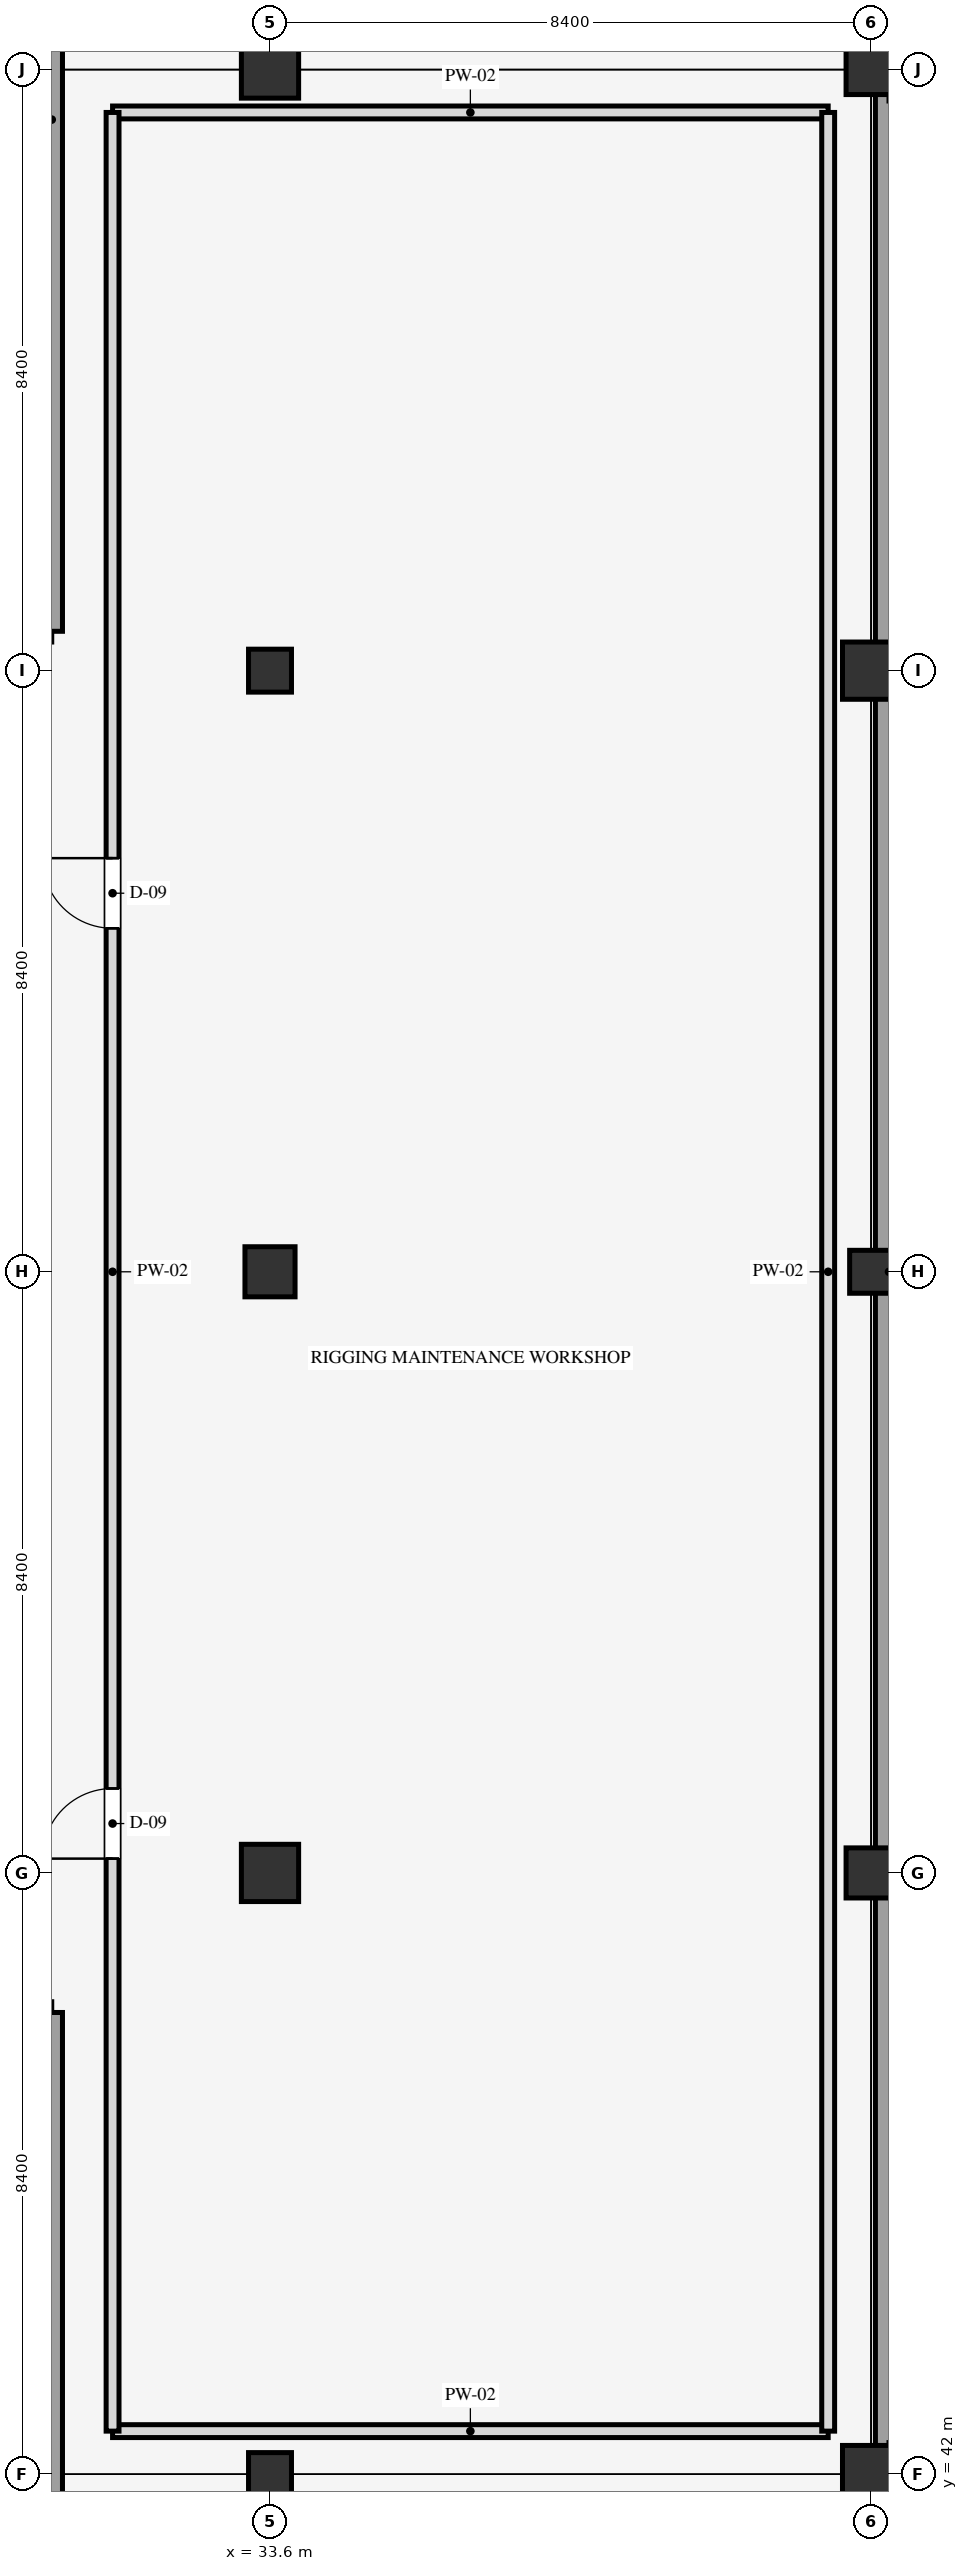
"""IFC4 building model, lengths in metres.
Left out: names, types, materials, properties, quantities, classifications, styles, units other than length and angle.
Written with IfcOpenShell. Run it as: python <this file> out.ifc"""

import sys

from ifc_helpers import new_model, si_unit, direction, frame, frame_2d, origin, origin_2d, place, context, subcontext, project, spatial, rectangle, extrude, element, fill, save


model = new_model("IFC4")
c1 = context("Model", 3, precision=1e-05, world=origin(), true_north=direction((0.0, 1.0)))
c2 = subcontext(c1, "Body", "Model", "MODEL_VIEW")
j1 = project(units=[si_unit("LENGTHUNIT", "METRE"), si_unit("PLANEANGLEUNIT", "RADIAN")], contexts=[c1])
p1 = place(None, origin())
s1 = spatial("IfcSite", under=j1, at=p1, CompositionType="ELEMENT")
p2 = place(p1, origin())
s2 = spatial("IfcBuilding", under=s1, at=p2, CompositionType="ELEMENT")
p3 = place(p2, frame((0.0, 0.0, 18.9)))
s3 = spatial("IfcBuildingStorey", under=s2, at=p3, CompositionType="ELEMENT", Elevation=18.9)
p4 = place(p3, frame((33.6, 42.0, 0.0), z_axis=(0.0, 0.0, 1.0), x_axis=(1.0, 0.0, 0.0)))
e1 = element("IfcColumn", 1, at=p4, inside=s3, PredefinedType="COLUMN", context=c2, shape_type="SweptSolid", body=[
    extrude(rectangle(XDim=0.6, YDim=0.6, at=origin_2d()), origin(), (0.0, 0.0, 1.0), 4.5),
])
p5 = place(p3, frame((33.6, 50.4, 0.0), z_axis=(0.0, 0.0, 1.0), x_axis=(1.0, 0.0, 0.0)))
e2 = element("IfcColumn", 2, at=p5, inside=s3, PredefinedType="COLUMN", context=c2, shape_type="SweptSolid", body=[
    extrude(rectangle(XDim=0.8, YDim=0.8, at=origin_2d()), origin(), (0.0, 0.0, 1.0), 4.5),
])
p6 = place(p3, frame((33.6, 58.8, 0.0), z_axis=(0.0, 0.0, 1.0), x_axis=(1.0, 0.0, 0.0)))
e3 = element("IfcColumn", 3, at=p6, inside=s3, PredefinedType="COLUMN", context=c2, shape_type="SweptSolid", body=[
    extrude(rectangle(XDim=0.7, YDim=0.7, at=origin_2d()), origin(), (0.0, 0.0, 1.0), 4.5),
])
p7 = place(p3, frame((33.6, 67.2, 0.0), z_axis=(0.0, 0.0, 1.0), x_axis=(1.0, 0.0, 0.0)))
e4 = element("IfcColumn", 4, at=p7, inside=s3, PredefinedType="COLUMN", context=c2, shape_type="SweptSolid", body=[
    extrude(rectangle(XDim=0.6, YDim=0.6, at=origin_2d()), origin(), (0.0, 0.0, 1.0), 4.5),
])
for number, where, z_axis, x_axis in (
    (5, (33.6, 75.6, 0.0), (0.0, 0.0, 1.0), (1.0, 0.0, 0.0)),
    (6, (42.0, 42.0, 0.0), (0.0, 0.0, 1.0), (1.0, 0.0, 0.0)),
):
    element("IfcColumn", number, at=place(p3, frame(where, z_axis=z_axis, x_axis=x_axis)), inside=s3, PredefinedType="COLUMN", context=c2, shape_type="SweptSolid", body=[
        extrude(rectangle(XDim=0.8, YDim=0.8, at=origin_2d()), origin(), (0.0, 0.0, 1.0), 4.5),
    ])
p8 = place(p3, frame((42.0, 50.4, 0.0), z_axis=(0.0, 0.0, 1.0), x_axis=(1.0, 0.0, 0.0)))
e7 = element("IfcColumn", 7, at=p8, inside=s3, PredefinedType="COLUMN", context=c2, shape_type="SweptSolid", body=[
    extrude(rectangle(XDim=0.7, YDim=0.7, at=origin_2d()), origin(), (0.0, 0.0, 1.0), 4.5),
])
p9 = place(p3, frame((42.0, 58.8, 0.0), z_axis=(0.0, 0.0, 1.0), x_axis=(1.0, 0.0, 0.0)))
e8 = element("IfcColumn", 8, at=p9, inside=s3, PredefinedType="COLUMN", context=c2, shape_type="SweptSolid", body=[
    extrude(rectangle(XDim=0.6, YDim=0.6, at=origin_2d()), origin(), (0.0, 0.0, 1.0), 4.5),
])
p10 = place(p3, frame((42.0, 67.2, 0.0), z_axis=(0.0, 0.0, 1.0), x_axis=(1.0, 0.0, 0.0)))
e9 = element("IfcColumn", 9, at=p10, inside=s3, PredefinedType="COLUMN", context=c2, shape_type="SweptSolid", body=[
    extrude(rectangle(XDim=0.8, YDim=0.8, at=origin_2d()), origin(), (0.0, 0.0, 1.0), 4.5),
])
p11 = place(p3, frame((42.0, 75.6, 0.0), z_axis=(0.0, 0.0, 1.0), x_axis=(1.0, 0.0, 0.0)))
e10 = element("IfcColumn", 10, at=p11, inside=s3, PredefinedType="COLUMN", context=c2, shape_type="SweptSolid", body=[
    extrude(rectangle(XDim=0.7, YDim=0.7, at=origin_2d()), origin(), (0.0, 0.0, 1.0), 4.5),
])
for number, where, z_axis, x_axis in (
    (11, (30.55, 34.15, 0.0), (0.0, 0.0, 1.0), (0.0, 1.0, 0.0)),
    (12, (30.55, 67.75, 0.0), (0.0, 0.0, 1.0), (0.0, 1.0, 0.0)),
):
    element("IfcWall", number, at=place(p3, frame(where, z_axis=z_axis, x_axis=x_axis)), inside=s3, PredefinedType="SHEAR", context=c2, shape_type="SweptSolid", body=[
        extrude(rectangle(XDim=14.3, YDim=0.3, at=frame_2d((7.15, 0.0))), origin(), (0.0, 0.0, 1.0), 4.5),
    ])
p12 = place(p3, frame((42.25, 42.25, 0.0), z_axis=(0.0, 0.0, 1.0), x_axis=(0.0, 1.0, 0.0)))
e13 = element("IfcWall", 13, at=p12, inside=s3, PredefinedType="SHEAR", context=c2, shape_type="SweptSolid", body=[
    extrude(rectangle(XDim=33.1, YDim=0.38, at=frame_2d((16.55, 0.0))), origin(), (0.0, 0.0, 1.0), 4.2),
])
for number, where, z_axis, x_axis in (
    (14, (31.4, 42.6, 0.0), (0.0, 0.0, 1.0), (1.0, 0.0, 0.0)),
    (15, (31.4, 75.0, 0.0), (0.0, 0.0, 1.0), (1.0, 0.0, 0.0)),
):
    element("IfcWall", number, at=place(p3, frame(where, z_axis=z_axis, x_axis=x_axis)), inside=s3, PredefinedType="PARTITIONING", context=c2, shape_type="SweptSolid", body=[
        extrude(rectangle(XDim=10.0, YDim=0.18, at=frame_2d((5.0, 0.0))), origin(), (0.0, 0.0, 1.0), 3.54),
    ])
p13 = place(p3, frame((31.4, 42.6, 0.0), z_axis=(0.0, 0.0, 1.0), x_axis=(0.0, 1.0, 0.0)))
e16 = element("IfcWall", 16, at=p13, inside=s3, PredefinedType="PARTITIONING", context=c2, shape_type="SweptSolid", body=[
    extrude(rectangle(XDim=32.4, YDim=0.18, at=frame_2d((16.2, 0.0))), origin(), (0.0, 0.0, 1.0), 3.54),
])
p14 = place(p13, frame((8.0, 0.0, 0.0)))
e17 = element("IfcOpeningElement", 17, at=p14, cuts=e16, PredefinedType="OPENING", context=c2, shape_type="SweptSolid", body=[
    extrude(rectangle(XDim=0.98, YDim=2.12, at=frame_2d((0.49, 1.06))), frame((0.0, 0.1, 0.0), z_axis=(0.0, -1.0, 0.0), x_axis=(1.0, 0.0, 0.0)), (0.0, 0.0, 1.0), 0.2),
])
p15 = place(p13, frame((21.0, 0.0, 0.0)))
e18 = element("IfcOpeningElement", 18, at=p15, cuts=e16, PredefinedType="OPENING", context=c2, shape_type="SweptSolid", body=[
    extrude(rectangle(XDim=0.98, YDim=2.12, at=frame_2d((0.49, 1.06))), frame((0.0, 0.1, 0.0), z_axis=(0.0, -1.0, 0.0), x_axis=(1.0, 0.0, 0.0)), (0.0, 0.0, 1.0), 0.2),
])
p16 = place(p3, frame((41.4, 42.6, 0.0), z_axis=(0.0, 0.0, 1.0), x_axis=(0.0, 1.0, 0.0)))
e19 = element("IfcWall", 19, at=p16, inside=s3, PredefinedType="PARTITIONING", context=c2, shape_type="SweptSolid", body=[
    extrude(rectangle(XDim=32.4, YDim=0.18, at=frame_2d((16.2, 0.0))), origin(), (0.0, 0.0, 1.0), 3.54),
])
p17 = place(p14, origin())
e20 = element("IfcDoor", 20, at=p17, inside=s3, OperationType="SINGLE_SWING_LEFT", PredefinedType="DOOR", context=c2, shape_type="SweptSolid", body=[
    extrude(rectangle(XDim=0.98, YDim=2.12, at=frame_2d((0.49, 1.06))), frame((0.0, 0.025, 0.0), z_axis=(0.0, -1.0, 0.0), x_axis=(1.0, 0.0, 0.0)), (0.0, 0.0, 1.0), 0.05),
])
fill(e17, e20)
p18 = place(p15, origin())
e21 = element("IfcDoor", 21, at=p18, inside=s3, OperationType="SINGLE_SWING_RIGHT", PredefinedType="DOOR", context=c2, shape_type="SweptSolid", body=[
    extrude(rectangle(XDim=0.98, YDim=2.12, at=frame_2d((0.49, 1.06))), frame((0.0, 0.025, 0.0), z_axis=(0.0, -1.0, 0.0), x_axis=(1.0, 0.0, 0.0)), (0.0, 0.0, 1.0), 0.05),
])
fill(e18, e21)
save(model, sys.argv[1])
